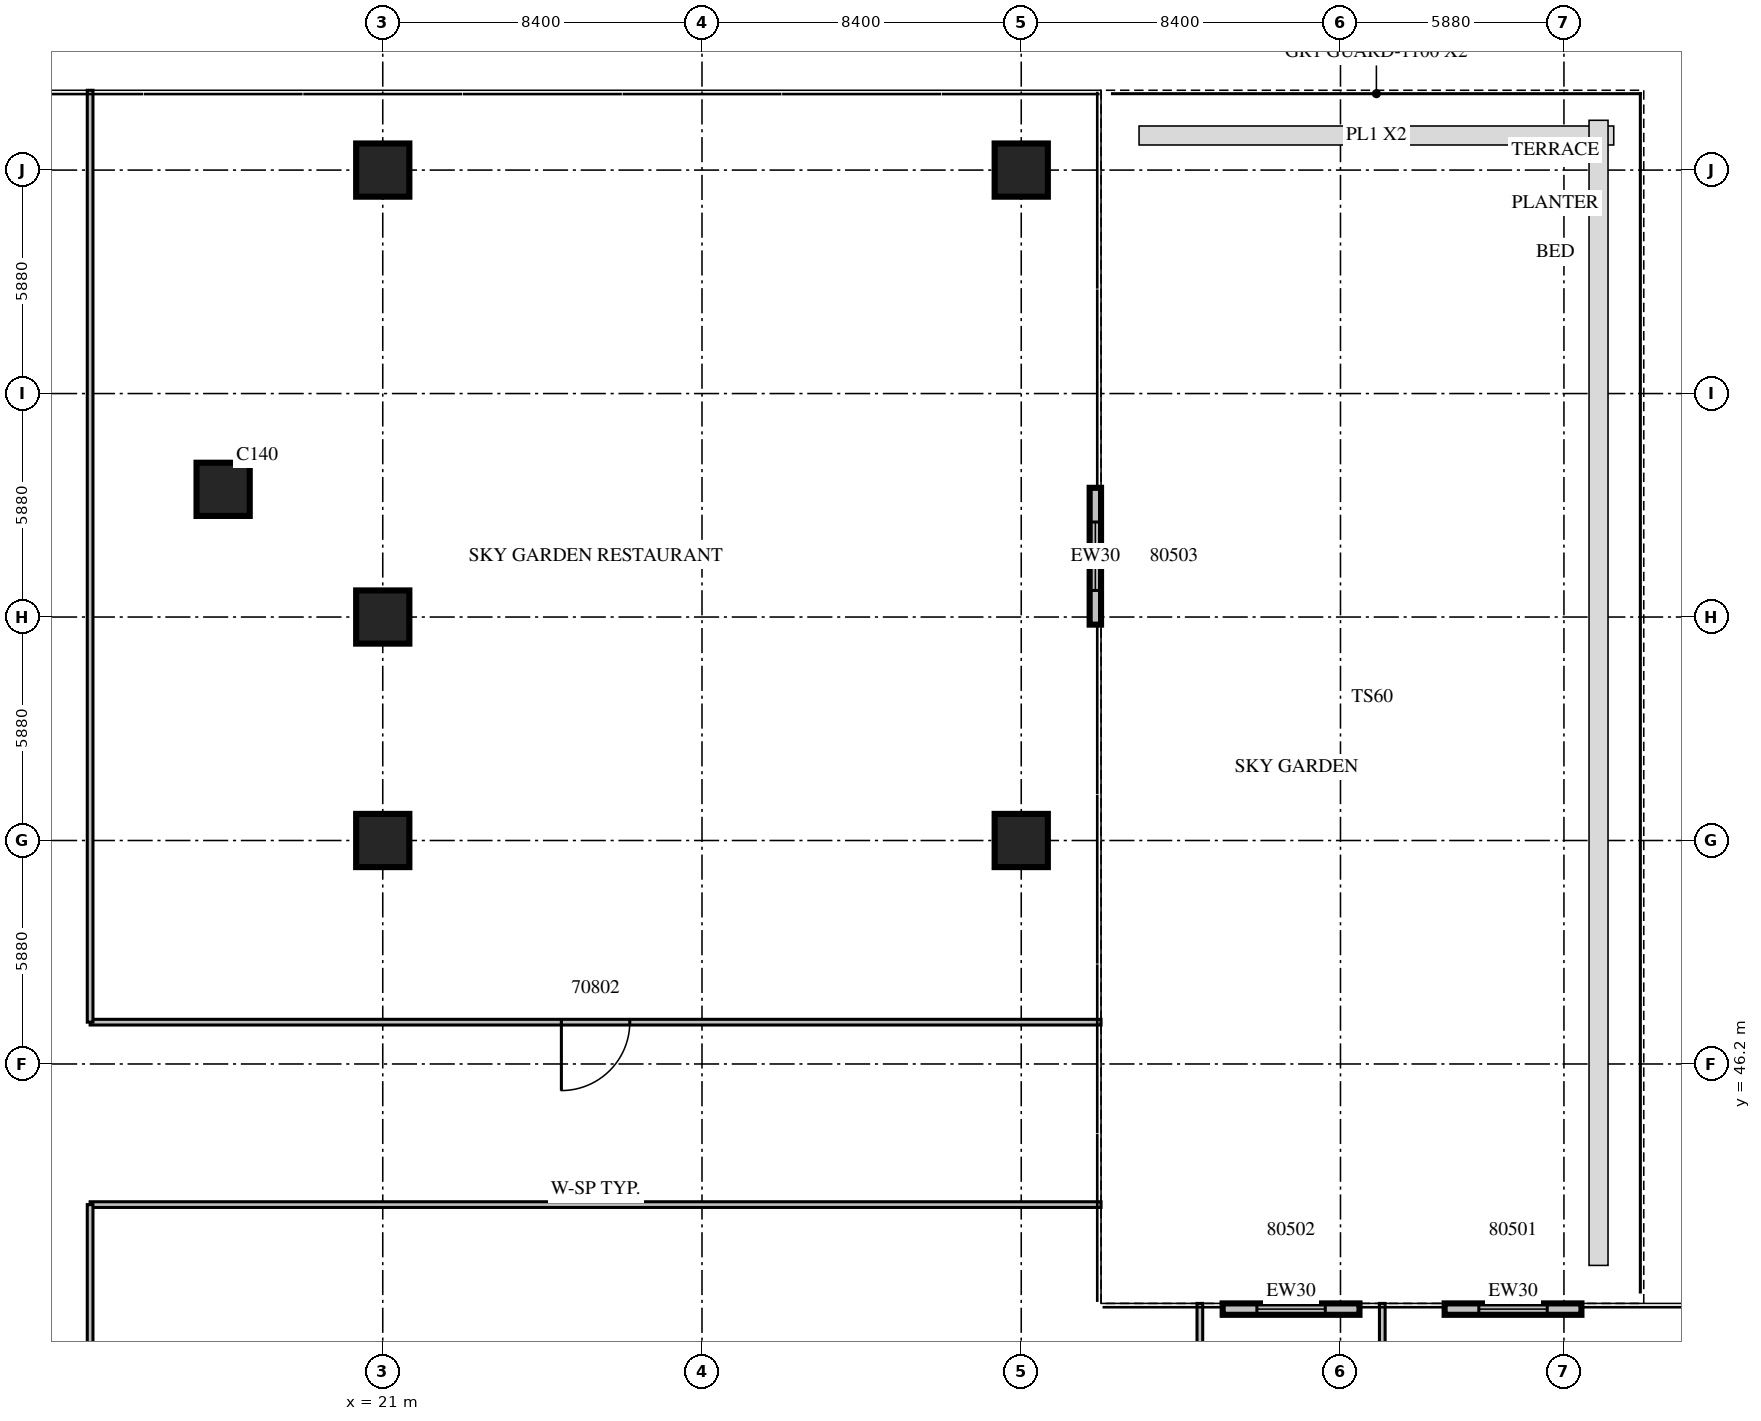
"""IFC4 building model, lengths in metres.
Left out: names, types, materials, properties, quantities, classifications, styles, units other than length and angle.
Written with IfcOpenShell. Run it as: python <this file> out.ifc"""

import sys

from ifc_helpers import new_model, si_unit, direction, frame, frame_2d, origin, origin_2d, place, context, subcontext, project, spatial, rectangle, extrude, source, transform, mapped, element, fill, save


model = new_model("IFC4")
c1 = context("Model", 3, precision=1e-05, world=origin(), true_north=direction((0.0, 1.0)))
c2 = subcontext(c1, "Body", "Model", "MODEL_VIEW")
j1 = project(units=[si_unit("LENGTHUNIT", "METRE"), si_unit("PLANEANGLEUNIT", "RADIAN")], contexts=[c1])
p1 = place(None, origin())
s1 = spatial("IfcSite", under=j1, at=p1, CompositionType="ELEMENT")
p2 = place(p1, origin())
s2 = spatial("IfcBuilding", under=s1, at=p2, CompositionType="ELEMENT")
p3 = place(p2, frame((0.0, 0.0, 29.1)))
s3 = spatial("IfcBuildingStorey", under=s2, at=p3, CompositionType="ELEMENT", Elevation=29.1)
m1 = source(origin(), c2, "Body", "SweptSolid", [
    extrude(rectangle(XDim=1.4, YDim=1.4, at=origin_2d()), origin(), (0.0, 0.0, 1.0), 5.4),
])
for number, where, z_axis, x_axis in (
    (1, (16.8, 61.32, 0.0), (0.0, 0.0, 1.0), (1.0, 0.0, 0.0)),
    (2, (21.0, 52.08, 0.0), (0.0, 0.0, 1.0), (1.0, 0.0, 0.0)),
    (3, (21.0, 57.96, 0.0), (0.0, 0.0, 1.0), (1.0, 0.0, 0.0)),
    (4, (21.0, 69.72, 0.0), (0.0, 0.0, 1.0), (1.0, 0.0, 0.0)),
    (5, (37.8, 52.08, 0.0), (0.0, 0.0, 1.0), (1.0, 0.0, 0.0)),
    (6, (37.8, 69.72, 0.0), (0.0, 0.0, 1.0), (1.0, 0.0, 0.0)),
):
    element("IfcColumn", number, at=place(p3, frame(where, z_axis=z_axis, x_axis=x_axis)), inside=s3, PredefinedType="COLUMN", context=c2, shape_type="MappedRepresentation", body=[
        mapped(m1, transform((0.0, 0.0, 0.0), scale=1.0)),
    ])
m2 = source(origin(), c2, "Body", "SweptSolid", [
    extrude(rectangle(XDim=3.6, YDim=0.3, at=frame_2d((1.8, 0.0))), origin(), (0.0, 0.0, 1.0), 4.8),
])
p4 = place(p3, frame((52.54, 39.75, 0.0), z_axis=(0.0, 0.0, 1.0), x_axis=(-1.0, 0.0, 0.0)))
e7 = element("IfcWall", 7, at=p4, inside=s3, PredefinedType="STANDARD", context=c2, shape_type="MappedRepresentation", body=[
    mapped(m2, transform((0.0, 0.0, 0.0), scale=1.0)),
])
m3 = source(origin(), c2, "Body", "SweptSolid", [
    extrude(rectangle(XDim=1.8, YDim=2.4, at=frame_2d((0.9, 1.2))), frame((0.0, 0.16, 0.0), z_axis=(0.0, -1.0, 0.0), x_axis=(1.0, 0.0, 0.0)), (0.0, 0.0, 1.0), 0.32),
])
p5 = place(p4, frame((0.9, 0.0, 0.0)))
e8 = element("IfcOpeningElement", 8, at=p5, cuts=e7, PredefinedType="OPENING", context=c2, shape_type="MappedRepresentation", body=[
    mapped(m3, transform((0.0, 0.0, 0.0), scale=1.0)),
])
p6 = place(p3, frame((46.7, 39.75, 0.0), z_axis=(0.0, 0.0, 1.0), x_axis=(-1.0, 0.0, 0.0)))
e9 = element("IfcWall", 9, at=p6, inside=s3, PredefinedType="STANDARD", context=c2, shape_type="MappedRepresentation", body=[
    mapped(m2, transform((0.0, 0.0, 0.0), scale=1.0)),
])
p7 = place(p6, frame((0.9, 0.0, 0.0)))
e10 = element("IfcOpeningElement", 10, at=p7, cuts=e9, PredefinedType="OPENING", context=c2, shape_type="MappedRepresentation", body=[
    mapped(m3, transform((0.0, 0.0, 0.0), scale=1.0)),
])
p8 = place(p3, frame((39.75, 57.76, 0.0), z_axis=(0.0, 0.0, 1.0), x_axis=(0.0, 1.0, 0.0)))
e11 = element("IfcWall", 11, at=p8, inside=s3, PredefinedType="STANDARD", context=c2, shape_type="MappedRepresentation", body=[
    mapped(m2, transform((0.0, 0.0, 0.0), scale=1.0)),
])
p9 = place(p8, frame((0.9, 0.0, 0.0)))
e12 = element("IfcOpeningElement", 12, at=p9, cuts=e11, PredefinedType="OPENING", context=c2, shape_type="MappedRepresentation", body=[
    mapped(m3, transform((0.0, 0.0, 0.0), scale=1.0)),
])
p10 = place(p3, frame((13.3, 42.5, 0.0), z_axis=(0.0, 0.0, 1.0), x_axis=(1.0, 0.0, 0.0)))
e13 = element("IfcWall", 13, at=p10, inside=s3, PredefinedType="PARTITIONING", context=c2, shape_type="SweptSolid", body=[
    extrude(rectangle(XDim=26.6, YDim=0.15, at=frame_2d((13.3, 0.0))), origin(), (0.0, 0.0, 1.0), 4.8),
])
m4 = source(origin(), c2, "Body", "SweptSolid", [
    extrude(rectangle(XDim=26.6, YDim=0.15, at=frame_2d((13.3, 0.0))), origin(), (0.0, 0.0, 1.0), 4.8),
])
p11 = place(p3, frame((13.3, 47.3, 0.0), z_axis=(0.0, 0.0, 1.0), x_axis=(1.0, 0.0, 0.0)))
e14 = element("IfcWall", 14, at=p11, inside=s3, PredefinedType="PARTITIONING", context=c2, shape_type="MappedRepresentation", body=[
    mapped(m4, transform((0.0, 0.0, 0.0), scale=1.0)),
])
m5 = source(origin(), c2, "Body", "SweptSolid", [
    extrude(rectangle(XDim=1.8, YDim=2.1, at=frame_2d((0.9, 1.05))), frame((0.0, 0.085, 0.0), z_axis=(0.0, -1.0, 0.0), x_axis=(1.0, 0.0, 0.0)), (0.0, 0.0, 1.0), 0.17),
])
p12 = place(p11, frame((12.4, 0.0, 0.0)))
e15 = element("IfcOpeningElement", 15, at=p12, cuts=e14, PredefinedType="OPENING", context=c2, shape_type="MappedRepresentation", body=[
    mapped(m5, transform((0.0, 0.0, 0.0), scale=1.0)),
])
m6 = source(origin(), c2, "Body", "SweptSolid", [
    extrude(rectangle(XDim=20.3, YDim=0.15, at=frame_2d((10.15, 0.0))), origin(), (0.0, 0.0, 1.0), 4.8),
])
p13 = place(p3, frame((13.3, 22.2, 0.0), z_axis=(0.0, 0.0, 1.0), x_axis=(0.0, 1.0, 0.0)))
e16 = element("IfcWall", 16, at=p13, inside=s3, PredefinedType="PARTITIONING", context=c2, shape_type="MappedRepresentation", body=[
    mapped(m6, transform((0.0, 0.0, 0.0), scale=1.0)),
])
m7 = source(origin(), c2, "Body", "SweptSolid", [
    extrude(rectangle(XDim=0.9, YDim=2.1, at=frame_2d((0.45, 1.05))), frame((0.0, 0.085, 0.0), z_axis=(0.0, -1.0, 0.0), x_axis=(1.0, 0.0, 0.0)), (0.0, 0.0, 1.0), 0.17),
])
p14 = place(p13, frame((2.55, 0.0, 0.0)))
e17 = element("IfcOpeningElement", 17, at=p14, cuts=e16, PredefinedType="OPENING", context=c2, shape_type="MappedRepresentation", body=[
    mapped(m7, transform((0.0, 0.0, 0.0), scale=1.0)),
])
m8 = source(origin(), c2, "Body", "SweptSolid", [
    extrude(rectangle(XDim=24.52, YDim=0.15, at=frame_2d((12.26, 0.0))), origin(), (0.0, 0.0, 1.0), 4.8),
])
p15 = place(p3, frame((13.3, 47.3, 0.0), z_axis=(0.0, 0.0, 1.0), x_axis=(0.0, 1.0, 0.0)))
e18 = element("IfcWall", 18, at=p15, inside=s3, PredefinedType="PARTITIONING", context=c2, shape_type="MappedRepresentation", body=[
    mapped(m8, transform((0.0, 0.0, 0.0), scale=1.0)),
])
p16 = place(p3, frame((42.5, 13.3, 0.0), z_axis=(0.0, 0.0, 1.0), x_axis=(0.0, 1.0, 0.0)))
e19 = element("IfcWall", 19, at=p16, inside=s3, PredefinedType="PARTITIONING", context=c2, shape_type="MappedRepresentation", body=[
    mapped(m4, transform((0.0, 0.0, 0.0), scale=1.0)),
])
p17 = place(p16, frame((12.4, 0.0, 0.0)))
e20 = element("IfcOpeningElement", 20, at=p17, cuts=e19, PredefinedType="OPENING", context=c2, shape_type="MappedRepresentation", body=[
    mapped(m5, transform((0.0, 0.0, 0.0), scale=1.0)),
])
p18 = place(p3, frame((47.3, 13.3, 0.0), z_axis=(0.0, 0.0, 1.0), x_axis=(0.0, 1.0, 0.0)))
e21 = element("IfcWall", 21, at=p18, inside=s3, PredefinedType="PARTITIONING", context=c2, shape_type="MappedRepresentation", body=[
    mapped(m4, transform((0.0, 0.0, 0.0), scale=1.0)),
])
p19 = place(p18, frame((12.4, 0.0, 0.0)))
e22 = element("IfcOpeningElement", 22, at=p19, cuts=e21, PredefinedType="OPENING", context=c2, shape_type="MappedRepresentation", body=[
    mapped(m5, transform((0.0, 0.0, 0.0), scale=1.0)),
])
m9 = source(origin(), c2, "Body", "SweptSolid", [
    extrude(rectangle(XDim=1.8, YDim=2.4, at=frame_2d((0.9, 1.2))), frame((0.0, 0.025, 0.0), z_axis=(0.0, -1.0, 0.0), x_axis=(1.0, 0.0, 0.0)), (0.0, 0.0, 1.0), 0.05),
])
p20 = place(p5, origin())
e23 = element("IfcDoor", 23, at=p20, inside=s3, OperationType="SLIDING_TO_LEFT", PredefinedType="DOOR", context=c2, shape_type="MappedRepresentation", body=[
    mapped(m9, transform((0.0, 0.0, 0.0), scale=1.0)),
])
fill(e8, e23)
p21 = place(p7, origin())
e24 = element("IfcDoor", 24, at=p21, inside=s3, OperationType="SLIDING_TO_LEFT", PredefinedType="DOOR", context=c2, shape_type="MappedRepresentation", body=[
    mapped(m9, transform((0.0, 0.0, 0.0), scale=1.0)),
])
fill(e10, e24)
p22 = place(p9, origin())
e25 = element("IfcDoor", 25, at=p22, inside=s3, OperationType="SLIDING_TO_LEFT", PredefinedType="DOOR", context=c2, shape_type="MappedRepresentation", body=[
    mapped(m9, transform((0.0, 0.0, 0.0), scale=1.0)),
])
fill(e12, e25)
m10 = source(origin(), c2, "Body", "SweptSolid", [
    extrude(rectangle(XDim=1.8, YDim=2.1, at=frame_2d((0.9, 1.05))), frame((0.0, 0.025, 0.0), z_axis=(0.0, -1.0, 0.0), x_axis=(1.0, 0.0, 0.0)), (0.0, 0.0, 1.0), 0.05),
])
p23 = place(p12, origin())
e26 = element("IfcDoor", 26, at=p23, inside=s3, OperationType="DOUBLE_DOOR_SINGLE_SWING", PredefinedType="DOOR", context=c2, shape_type="MappedRepresentation", body=[
    mapped(m10, transform((0.0, 0.0, 0.0), scale=1.0)),
])
fill(e15, e26)
save(model, sys.argv[1])
